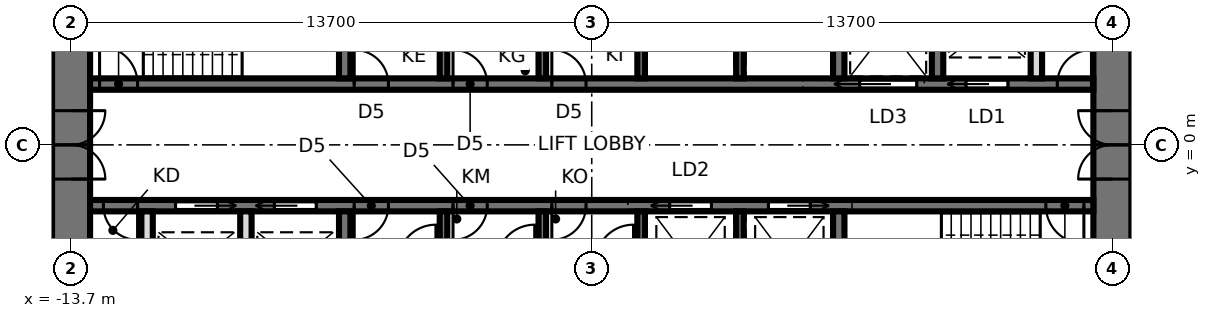
"""IFC4 building model, lengths in metres.
Left out: names, types, materials, properties, quantities, classifications, styles, units other than length and angle.
Written with IfcOpenShell. Run it as: python <this file> out.ifc"""

import sys

from ifc_helpers import new_model, si_unit, direction, frame, frame_2d, origin, place, context, subcontext, project, spatial, rectangle, extrude, element, fill, save


model = new_model("IFC4")
c1 = context("Model", 3, precision=1e-05, world=origin(), true_north=direction((0.0, 1.0)))
c2 = subcontext(c1, "Body", "Model", "MODEL_VIEW")
j1 = project(units=[si_unit("LENGTHUNIT", "METRE"), si_unit("PLANEANGLEUNIT", "RADIAN")], contexts=[c1])
p1 = place(None, origin())
s1 = spatial("IfcSite", under=j1, at=p1, CompositionType="ELEMENT")
p2 = place(p1, origin())
s2 = spatial("IfcBuilding", under=s1, at=p2, CompositionType="ELEMENT")
p3 = place(p2, frame((0.0, 0.0, 242.3)))
s3 = spatial("IfcBuildingStorey", under=s2, at=p3, CompositionType="ELEMENT", Elevation=242.3)
p4 = place(p3, frame((13.7, -9.5, 0.0), z_axis=(0.0, 0.0, 1.0), x_axis=(0.0, 1.0, 0.0)))
e1 = element("IfcWall", 1, at=p4, inside=s3, PredefinedType="SHEAR", context=c2, shape_type="SweptSolid", body=[
    extrude(rectangle(XDim=19.0, YDim=1.0, at=frame_2d((9.5, 0.0))), origin(), (0.0, 0.0, 1.0), 3.9),
])
p5 = place(p4, frame((8.6, 0.0, 0.0)))
e2 = element("IfcOpeningElement", 2, at=p5, cuts=e1, PredefinedType="OPENING", context=c2, shape_type="SweptSolid", body=[
    extrude(rectangle(XDim=1.8, YDim=2.4, at=frame_2d((0.9, 1.2))), frame((0.0, 0.51, 0.0), z_axis=(0.0, -1.0, 0.0), x_axis=(1.0, 0.0, 0.0)), (0.0, 0.0, 1.0), 1.02),
])
p6 = place(p3, frame((-13.7, 9.5, 0.0), z_axis=(0.0, 0.0, 1.0), x_axis=(0.0, -1.0, 0.0)))
e3 = element("IfcWall", 3, at=p6, inside=s3, PredefinedType="SHEAR", context=c2, shape_type="SweptSolid", body=[
    extrude(rectangle(XDim=19.0, YDim=1.0, at=frame_2d((9.5, 0.0))), origin(), (0.0, 0.0, 1.0), 3.9),
])
p7 = place(p6, frame((8.6, 0.0, 0.0)))
e4 = element("IfcOpeningElement", 4, at=p7, cuts=e3, PredefinedType="OPENING", context=c2, shape_type="SweptSolid", body=[
    extrude(rectangle(XDim=1.8, YDim=2.4, at=frame_2d((0.9, 1.2))), frame((0.0, 0.51, 0.0), z_axis=(0.0, -1.0, 0.0), x_axis=(1.0, 0.0, 0.0)), (0.0, 0.0, 1.0), 1.02),
])
p8 = place(p3, frame((-13.2, 1.6, 0.0), z_axis=(0.0, 0.0, 1.0), x_axis=(1.0, 0.0, 0.0)))
e5 = element("IfcWall", 5, at=p8, inside=s3, PredefinedType="SHEAR", context=c2, shape_type="SweptSolid", body=[
    extrude(rectangle(XDim=26.4, YDim=0.3, at=frame_2d((13.2, 0.0))), origin(), (0.0, 0.0, 1.0), 3.9),
])
p9 = place(p8, frame((0.25, 0.0, 0.0)))
e6 = element("IfcOpeningElement", 6, at=p9, cuts=e5, PredefinedType="OPENING", context=c2, shape_type="SweptSolid", body=[
    extrude(rectangle(XDim=1.0, YDim=2.1, at=frame_2d((0.5, 1.05))), frame((0.0, 0.16, 0.0), z_axis=(0.0, -1.0, 0.0), x_axis=(1.0, 0.0, 0.0)), (0.0, 0.0, 1.0), 0.32),
])
p10 = place(p8, frame((23.05, 0.0, 0.0)))
e7 = element("IfcOpeningElement", 7, at=p10, cuts=e5, PredefinedType="OPENING", context=c2, shape_type="SweptSolid", body=[
    extrude(rectangle(XDim=1.1, YDim=2.3, at=frame_2d((0.55, 1.15))), frame((0.0, 0.16, 0.0), z_axis=(0.0, -1.0, 0.0), x_axis=(1.0, 0.0, 0.0)), (0.0, 0.0, 1.0), 0.32),
])
p11 = place(p8, frame((20.25, 0.0, 0.0)))
e8 = element("IfcOpeningElement", 8, at=p11, cuts=e5, PredefinedType="OPENING", context=c2, shape_type="SweptSolid", body=[
    extrude(rectangle(XDim=1.5, YDim=2.4, at=frame_2d((0.75, 1.2))), frame((0.0, 0.16, 0.0), z_axis=(0.0, -1.0, 0.0), x_axis=(1.0, 0.0, 0.0)), (0.0, 0.0, 1.0), 0.32),
])
p12 = place(p8, frame((6.95, 0.0, 0.0)))
e9 = element("IfcOpeningElement", 9, at=p12, cuts=e5, PredefinedType="OPENING", context=c2, shape_type="SweptSolid", body=[
    extrude(rectangle(XDim=0.9, YDim=2.1, at=frame_2d((0.45, 1.05))), frame((0.0, 0.16, 0.0), z_axis=(0.0, -1.0, 0.0), x_axis=(1.0, 0.0, 0.0)), (0.0, 0.0, 1.0), 0.32),
])
p13 = place(p8, frame((9.55, 0.0, 0.0)))
e10 = element("IfcOpeningElement", 10, at=p13, cuts=e5, PredefinedType="OPENING", context=c2, shape_type="SweptSolid", body=[
    extrude(rectangle(XDim=0.9, YDim=2.1, at=frame_2d((0.45, 1.05))), frame((0.0, 0.16, 0.0), z_axis=(0.0, -1.0, 0.0), x_axis=(1.0, 0.0, 0.0)), (0.0, 0.0, 1.0), 0.32),
])
p14 = place(p8, frame((12.15, 0.0, 0.0)))
e11 = element("IfcOpeningElement", 11, at=p14, cuts=e5, PredefinedType="OPENING", context=c2, shape_type="SweptSolid", body=[
    extrude(rectangle(XDim=0.9, YDim=2.1, at=frame_2d((0.45, 1.05))), frame((0.0, 0.16, 0.0), z_axis=(0.0, -1.0, 0.0), x_axis=(1.0, 0.0, 0.0)), (0.0, 0.0, 1.0), 0.32),
])
p15 = place(p8, frame((25.45, 0.0, 0.0)))
e12 = element("IfcOpeningElement", 12, at=p15, cuts=e5, PredefinedType="OPENING", context=c2, shape_type="SweptSolid", body=[
    extrude(rectangle(XDim=0.9, YDim=2.1, at=frame_2d((0.45, 1.05))), frame((0.0, 0.16, 0.0), z_axis=(0.0, -1.0, 0.0), x_axis=(1.0, 0.0, 0.0)), (0.0, 0.0, 1.0), 0.32),
])
p16 = place(p3, frame((-13.2, -1.6, 0.0), z_axis=(0.0, 0.0, 1.0), x_axis=(1.0, 0.0, 0.0)))
e13 = element("IfcWall", 13, at=p16, inside=s3, PredefinedType="SHEAR", context=c2, shape_type="SweptSolid", body=[
    extrude(rectangle(XDim=26.4, YDim=0.3, at=frame_2d((13.2, 0.0))), origin(), (0.0, 0.0, 1.0), 3.9),
])
p17 = place(p16, frame((25.15, 0.0, 0.0)))
e14 = element("IfcOpeningElement", 14, at=p17, cuts=e13, PredefinedType="OPENING", context=c2, shape_type="SweptSolid", body=[
    extrude(rectangle(XDim=1.0, YDim=2.1, at=frame_2d((0.5, 1.05))), frame((0.0, 0.16, 0.0), z_axis=(0.0, -1.0, 0.0), x_axis=(1.0, 0.0, 0.0)), (0.0, 0.0, 1.0), 0.32),
])
p18 = place(p16, frame((6.95, 0.0, 0.0)))
e15 = element("IfcOpeningElement", 15, at=p18, cuts=e13, PredefinedType="OPENING", context=c2, shape_type="SweptSolid", body=[
    extrude(rectangle(XDim=0.9, YDim=2.1, at=frame_2d((0.45, 1.05))), frame((0.0, 0.16, 0.0), z_axis=(0.0, -1.0, 0.0), x_axis=(1.0, 0.0, 0.0)), (0.0, 0.0, 1.0), 0.32),
])
p19 = place(p16, frame((9.55, 0.0, 0.0)))
e16 = element("IfcOpeningElement", 16, at=p19, cuts=e13, PredefinedType="OPENING", context=c2, shape_type="SweptSolid", body=[
    extrude(rectangle(XDim=0.9, YDim=2.1, at=frame_2d((0.45, 1.05))), frame((0.0, 0.16, 0.0), z_axis=(0.0, -1.0, 0.0), x_axis=(1.0, 0.0, 0.0)), (0.0, 0.0, 1.0), 0.32),
])
p20 = place(p16, frame((12.15, 0.0, 0.0)))
e17 = element("IfcOpeningElement", 17, at=p20, cuts=e13, PredefinedType="OPENING", context=c2, shape_type="SweptSolid", body=[
    extrude(rectangle(XDim=0.9, YDim=2.1, at=frame_2d((0.45, 1.05))), frame((0.0, 0.16, 0.0), z_axis=(0.0, -1.0, 0.0), x_axis=(1.0, 0.0, 0.0)), (0.0, 0.0, 1.0), 0.32),
])
p21 = place(p16, frame((15.25, 0.0, 0.0)))
e18 = element("IfcOpeningElement", 18, at=p21, cuts=e13, PredefinedType="OPENING", context=c2, shape_type="SweptSolid", body=[
    extrude(rectangle(XDim=1.1, YDim=2.3, at=frame_2d((0.55, 1.15))), frame((0.0, 0.16, 0.0), z_axis=(0.0, -1.0, 0.0), x_axis=(1.0, 0.0, 0.0)), (0.0, 0.0, 1.0), 0.32),
])
p22 = place(p16, frame((17.85, 0.0, 0.0)))
e19 = element("IfcOpeningElement", 19, at=p22, cuts=e13, PredefinedType="OPENING", context=c2, shape_type="SweptSolid", body=[
    extrude(rectangle(XDim=1.1, YDim=2.3, at=frame_2d((0.55, 1.15))), frame((0.0, 0.16, 0.0), z_axis=(0.0, -1.0, 0.0), x_axis=(1.0, 0.0, 0.0)), (0.0, 0.0, 1.0), 0.32),
])
p23 = place(p16, frame((4.85, 0.0, 0.0)))
e20 = element("IfcOpeningElement", 20, at=p23, cuts=e13, PredefinedType="OPENING", context=c2, shape_type="SweptSolid", body=[
    extrude(rectangle(XDim=1.1, YDim=2.3, at=frame_2d((0.55, 1.15))), frame((0.0, 0.16, 0.0), z_axis=(0.0, -1.0, 0.0), x_axis=(1.0, 0.0, 0.0)), (0.0, 0.0, 1.0), 0.32),
])
p24 = place(p16, frame((2.25, 0.0, 0.0)))
e21 = element("IfcOpeningElement", 21, at=p24, cuts=e13, PredefinedType="OPENING", context=c2, shape_type="SweptSolid", body=[
    extrude(rectangle(XDim=1.1, YDim=2.3, at=frame_2d((0.55, 1.15))), frame((0.0, 0.16, 0.0), z_axis=(0.0, -1.0, 0.0), x_axis=(1.0, 0.0, 0.0)), (0.0, 0.0, 1.0), 0.32),
])
p25 = place(p16, frame((0.35, 0.0, 0.0)))
e22 = element("IfcOpeningElement", 22, at=p25, cuts=e13, PredefinedType="OPENING", context=c2, shape_type="SweptSolid", body=[
    extrude(rectangle(XDim=0.9, YDim=2.1, at=frame_2d((0.45, 1.05))), frame((0.0, 0.16, 0.0), z_axis=(0.0, -1.0, 0.0), x_axis=(1.0, 0.0, 0.0)), (0.0, 0.0, 1.0), 0.32),
])
for number, where, z_axis, x_axis in (
    (23, (-6.5, 1.75, 0.0), (0.0, 0.0, 1.0), (0.0, 1.0, 0.0)),
    (24, (6.5, 1.75, 0.0), (0.0, 0.0, 1.0), (0.0, 1.0, 0.0)),
):
    element("IfcWall", number, at=place(p3, frame(where, z_axis=z_axis, x_axis=x_axis)), inside=s3, PredefinedType="SHEAR", context=c2, shape_type="SweptSolid", body=[
        extrude(rectangle(XDim=2.7, YDim=0.3, at=frame_2d((1.35, 0.0))), origin(), (0.0, 0.0, 1.0), 3.9),
    ])
for number, where, z_axis, x_axis in (
    (25, (-3.9, 1.75, 0.0), (0.0, 0.0, 1.0), (0.0, 1.0, 0.0)),
    (26, (-1.3, 1.75, 0.0), (0.0, 0.0, 1.0), (0.0, 1.0, 0.0)),
    (27, (1.3, 1.75, 0.0), (0.0, 0.0, 1.0), (0.0, 1.0, 0.0)),
    (28, (3.9, 1.75, 0.0), (0.0, 0.0, 1.0), (0.0, 1.0, 0.0)),
):
    element("IfcWall", number, at=place(p3, frame(where, z_axis=z_axis, x_axis=x_axis)), inside=s3, PredefinedType="SHEAR", context=c2, shape_type="SweptSolid", body=[
        extrude(rectangle(XDim=2.7, YDim=0.2, at=frame_2d((1.35, 0.0))), origin(), (0.0, 0.0, 1.0), 3.9),
    ])
for number, where, z_axis, x_axis in (
    (29, (-6.5, -1.75, 0.0), (0.0, 0.0, 1.0), (0.0, -1.0, 0.0)),
    (30, (6.5, -1.75, 0.0), (0.0, 0.0, 1.0), (0.0, -1.0, 0.0)),
):
    element("IfcWall", number, at=place(p3, frame(where, z_axis=z_axis, x_axis=x_axis)), inside=s3, PredefinedType="SHEAR", context=c2, shape_type="SweptSolid", body=[
        extrude(rectangle(XDim=2.7, YDim=0.3, at=frame_2d((1.35, 0.0))), origin(), (0.0, 0.0, 1.0), 3.9),
    ])
for number, where, z_axis, x_axis in (
    (31, (-3.9, -1.75, 0.0), (0.0, 0.0, 1.0), (0.0, -1.0, 0.0)),
    (32, (-1.3, -1.75, 0.0), (0.0, 0.0, 1.0), (0.0, -1.0, 0.0)),
    (33, (1.3, -1.75, 0.0), (0.0, 0.0, 1.0), (0.0, -1.0, 0.0)),
    (34, (3.9, -1.75, 0.0), (0.0, 0.0, 1.0), (0.0, -1.0, 0.0)),
):
    element("IfcWall", number, at=place(p3, frame(where, z_axis=z_axis, x_axis=x_axis)), inside=s3, PredefinedType="SHEAR", context=c2, shape_type="SweptSolid", body=[
        extrude(rectangle(XDim=2.7, YDim=0.2, at=frame_2d((1.35, 0.0))), origin(), (0.0, 0.0, 1.0), 3.9),
    ])
p26 = place(p3, frame((9.1, 1.75, 0.0), z_axis=(0.0, 0.0, 1.0), x_axis=(0.0, 1.0, 0.0)))
e35 = element("IfcWall", 35, at=p26, inside=s3, PredefinedType="SHEAR", context=c2, shape_type="SweptSolid", body=[
    extrude(rectangle(XDim=2.7, YDim=0.3, at=frame_2d((1.35, 0.0))), origin(), (0.0, 0.0, 1.0), 3.9),
])
for number, where, z_axis, x_axis in (
    (36, (-9.1, -1.75, 0.0), (0.0, 0.0, 1.0), (0.0, -1.0, 0.0)),
    (37, (-11.7, -1.75, 0.0), (0.0, 0.0, 1.0), (0.0, -1.0, 0.0)),
    (38, (11.7, 1.75, 0.0), (0.0, 0.0, 1.0), (0.0, 1.0, 0.0)),
):
    element("IfcWall", number, at=place(p3, frame(where, z_axis=z_axis, x_axis=x_axis)), inside=s3, PredefinedType="SOLIDWALL", context=c2, shape_type="SweptSolid", body=[
        extrude(rectangle(XDim=2.7, YDim=0.3, at=frame_2d((1.35, 0.0))), origin(), (0.0, 0.0, 1.0), 3.7),
    ])
p27 = place(p7, origin())
e39 = element("IfcDoor", 39, at=p27, inside=s3, OperationType="DOUBLE_DOOR_SINGLE_SWING", PredefinedType="DOOR", context=c2, shape_type="SweptSolid", body=[
    extrude(rectangle(XDim=1.72, YDim=2.36, at=frame_2d((0.9, 1.18))), frame((0.0, 0.025, 0.0), z_axis=(0.0, -1.0, 0.0), x_axis=(1.0, 0.0, 0.0)), (0.0, 0.0, 1.0), 0.05),
    extrude(rectangle(XDim=0.04, YDim=2.4, at=frame_2d((0.02, 1.2))), frame((0.0, 0.25, 0.0), z_axis=(0.0, -1.0, 0.0), x_axis=(1.0, 0.0, 0.0)), (0.0, 0.0, 1.0), 0.5),
    extrude(rectangle(XDim=0.04, YDim=2.4, at=frame_2d((1.78, 1.2))), frame((0.0, 0.25, 0.0), z_axis=(0.0, -1.0, 0.0), x_axis=(1.0, 0.0, 0.0)), (0.0, 0.0, 1.0), 0.5),
    extrude(rectangle(XDim=1.72, YDim=0.04, at=frame_2d((0.9, 2.38))), frame((0.0, 0.25, 0.0), z_axis=(0.0, -1.0, 0.0), x_axis=(1.0, 0.0, 0.0)), (0.0, 0.0, 1.0), 0.5),
])
fill(e4, e39)
p28 = place(p5, origin())
e40 = element("IfcDoor", 40, at=p28, inside=s3, OperationType="DOUBLE_DOOR_SINGLE_SWING", PredefinedType="DOOR", context=c2, shape_type="SweptSolid", body=[
    extrude(rectangle(XDim=1.72, YDim=2.36, at=frame_2d((0.9, 1.18))), frame((0.0, 0.025, 0.0), z_axis=(0.0, -1.0, 0.0), x_axis=(1.0, 0.0, 0.0)), (0.0, 0.0, 1.0), 0.05),
    extrude(rectangle(XDim=0.04, YDim=2.4, at=frame_2d((0.02, 1.2))), frame((0.0, 0.25, 0.0), z_axis=(0.0, -1.0, 0.0), x_axis=(1.0, 0.0, 0.0)), (0.0, 0.0, 1.0), 0.5),
    extrude(rectangle(XDim=0.04, YDim=2.4, at=frame_2d((1.78, 1.2))), frame((0.0, 0.25, 0.0), z_axis=(0.0, -1.0, 0.0), x_axis=(1.0, 0.0, 0.0)), (0.0, 0.0, 1.0), 0.5),
    extrude(rectangle(XDim=1.72, YDim=0.04, at=frame_2d((0.9, 2.38))), frame((0.0, 0.25, 0.0), z_axis=(0.0, -1.0, 0.0), x_axis=(1.0, 0.0, 0.0)), (0.0, 0.0, 1.0), 0.5),
])
fill(e2, e40)
p29 = place(p9, origin())
e41 = element("IfcDoor", 41, at=p29, inside=s3, OperationType="SINGLE_SWING_LEFT", PredefinedType="DOOR", context=c2, shape_type="SweptSolid", body=[
    extrude(rectangle(XDim=1.0, YDim=2.1, at=frame_2d((0.5, 1.05))), frame((0.0, 0.025, 0.0), z_axis=(0.0, -1.0, 0.0), x_axis=(1.0, 0.0, 0.0)), (0.0, 0.0, 1.0), 0.05),
])
fill(e6, e41)
p30 = place(p17, frame((1.0, 0.0, 0.0), z_axis=(0.0, 0.0, 1.0), x_axis=(-1.0, 0.0, 0.0)))
e42 = element("IfcDoor", 42, at=p30, inside=s3, OperationType="SINGLE_SWING_LEFT", PredefinedType="DOOR", context=c2, shape_type="SweptSolid", body=[
    extrude(rectangle(XDim=1.0, YDim=2.1, at=frame_2d((0.5, 1.05))), frame((0.0, 0.025, 0.0), z_axis=(0.0, -1.0, 0.0), x_axis=(1.0, 0.0, 0.0)), (0.0, 0.0, 1.0), 0.05),
])
fill(e14, e42)
p31 = place(p10, origin())
e43 = element("IfcDoor", 43, at=p31, inside=s3, OperationType="SLIDING_TO_LEFT", PredefinedType="DOOR", context=c2, shape_type="SweptSolid", body=[
    extrude(rectangle(XDim=1.1, YDim=2.3, at=frame_2d((0.55, 1.15))), frame((0.0, 0.025, 0.0), z_axis=(0.0, -1.0, 0.0), x_axis=(1.0, 0.0, 0.0)), (0.0, 0.0, 1.0), 0.05),
])
fill(e7, e43)
p32 = place(p11, origin())
e44 = element("IfcDoor", 44, at=p32, inside=s3, OperationType="SLIDING_TO_LEFT", PredefinedType="DOOR", context=c2, shape_type="SweptSolid", body=[
    extrude(rectangle(XDim=1.5, YDim=2.4, at=frame_2d((0.75, 1.2))), frame((0.0, 0.025, 0.0), z_axis=(0.0, -1.0, 0.0), x_axis=(1.0, 0.0, 0.0)), (0.0, 0.0, 1.0), 0.05),
])
fill(e8, e44)
p33 = place(p12, origin())
e45 = element("IfcDoor", 45, at=p33, inside=s3, OperationType="SINGLE_SWING_LEFT", PredefinedType="DOOR", context=c2, shape_type="SweptSolid", body=[
    extrude(rectangle(XDim=0.9, YDim=2.1, at=frame_2d((0.45, 1.05))), frame((0.0, 0.025, 0.0), z_axis=(0.0, -1.0, 0.0), x_axis=(1.0, 0.0, 0.0)), (0.0, 0.0, 1.0), 0.05),
])
fill(e9, e45)
p34 = place(p13, origin())
e46 = element("IfcDoor", 46, at=p34, inside=s3, OperationType="SINGLE_SWING_LEFT", PredefinedType="DOOR", context=c2, shape_type="SweptSolid", body=[
    extrude(rectangle(XDim=0.9, YDim=2.1, at=frame_2d((0.45, 1.05))), frame((0.0, 0.025, 0.0), z_axis=(0.0, -1.0, 0.0), x_axis=(1.0, 0.0, 0.0)), (0.0, 0.0, 1.0), 0.05),
])
fill(e10, e46)
p35 = place(p14, origin())
e47 = element("IfcDoor", 47, at=p35, inside=s3, OperationType="SINGLE_SWING_LEFT", PredefinedType="DOOR", context=c2, shape_type="SweptSolid", body=[
    extrude(rectangle(XDim=0.9, YDim=2.1, at=frame_2d((0.45, 1.05))), frame((0.0, 0.025, 0.0), z_axis=(0.0, -1.0, 0.0), x_axis=(1.0, 0.0, 0.0)), (0.0, 0.0, 1.0), 0.05),
])
fill(e11, e47)
p36 = place(p18, frame((0.9, 0.0, 0.0), z_axis=(0.0, 0.0, 1.0), x_axis=(-1.0, 0.0, 0.0)))
e48 = element("IfcDoor", 48, at=p36, inside=s3, OperationType="SINGLE_SWING_RIGHT", PredefinedType="DOOR", context=c2, shape_type="SweptSolid", body=[
    extrude(rectangle(XDim=0.9, YDim=2.1, at=frame_2d((0.45, 1.05))), frame((0.0, 0.025, 0.0), z_axis=(0.0, -1.0, 0.0), x_axis=(1.0, 0.0, 0.0)), (0.0, 0.0, 1.0), 0.05),
])
fill(e15, e48)
p37 = place(p19, frame((0.9, 0.0, 0.0), z_axis=(0.0, 0.0, 1.0), x_axis=(-1.0, 0.0, 0.0)))
e49 = element("IfcDoor", 49, at=p37, inside=s3, OperationType="SINGLE_SWING_RIGHT", PredefinedType="DOOR", context=c2, shape_type="SweptSolid", body=[
    extrude(rectangle(XDim=0.9, YDim=2.1, at=frame_2d((0.45, 1.05))), frame((0.0, 0.025, 0.0), z_axis=(0.0, -1.0, 0.0), x_axis=(1.0, 0.0, 0.0)), (0.0, 0.0, 1.0), 0.05),
])
fill(e16, e49)
p38 = place(p20, frame((0.9, 0.0, 0.0), z_axis=(0.0, 0.0, 1.0), x_axis=(-1.0, 0.0, 0.0)))
e50 = element("IfcDoor", 50, at=p38, inside=s3, OperationType="SINGLE_SWING_RIGHT", PredefinedType="DOOR", context=c2, shape_type="SweptSolid", body=[
    extrude(rectangle(XDim=0.9, YDim=2.1, at=frame_2d((0.45, 1.05))), frame((0.0, 0.025, 0.0), z_axis=(0.0, -1.0, 0.0), x_axis=(1.0, 0.0, 0.0)), (0.0, 0.0, 1.0), 0.05),
])
fill(e17, e50)
p39 = place(p21, frame((1.1, 0.0, 0.0), z_axis=(0.0, 0.0, 1.0), x_axis=(-1.0, 0.0, 0.0)))
e51 = element("IfcDoor", 51, at=p39, inside=s3, OperationType="SLIDING_TO_RIGHT", PredefinedType="DOOR", context=c2, shape_type="SweptSolid", body=[
    extrude(rectangle(XDim=1.1, YDim=2.3, at=frame_2d((0.55, 1.15))), frame((0.0, 0.025, 0.0), z_axis=(0.0, -1.0, 0.0), x_axis=(1.0, 0.0, 0.0)), (0.0, 0.0, 1.0), 0.05),
])
fill(e18, e51)
p40 = place(p22, frame((1.1, 0.0, 0.0), z_axis=(0.0, 0.0, 1.0), x_axis=(-1.0, 0.0, 0.0)))
e52 = element("IfcDoor", 52, at=p40, inside=s3, OperationType="SLIDING_TO_LEFT", PredefinedType="DOOR", context=c2, shape_type="SweptSolid", body=[
    extrude(rectangle(XDim=1.1, YDim=2.3, at=frame_2d((0.55, 1.15))), frame((0.0, 0.025, 0.0), z_axis=(0.0, -1.0, 0.0), x_axis=(1.0, 0.0, 0.0)), (0.0, 0.0, 1.0), 0.05),
])
fill(e19, e52)
p41 = place(p23, frame((1.1, 0.0, 0.0), z_axis=(0.0, 0.0, 1.0), x_axis=(-1.0, 0.0, 0.0)))
e53 = element("IfcDoor", 53, at=p41, inside=s3, OperationType="SLIDING_TO_RIGHT", PredefinedType="DOOR", context=c2, shape_type="SweptSolid", body=[
    extrude(rectangle(XDim=1.1, YDim=2.3, at=frame_2d((0.55, 1.15))), frame((0.0, 0.025, 0.0), z_axis=(0.0, -1.0, 0.0), x_axis=(1.0, 0.0, 0.0)), (0.0, 0.0, 1.0), 0.05),
])
fill(e20, e53)
p42 = place(p24, frame((1.1, 0.0, 0.0), z_axis=(0.0, 0.0, 1.0), x_axis=(-1.0, 0.0, 0.0)))
e54 = element("IfcDoor", 54, at=p42, inside=s3, OperationType="SLIDING_TO_LEFT", PredefinedType="DOOR", context=c2, shape_type="SweptSolid", body=[
    extrude(rectangle(XDim=1.1, YDim=2.3, at=frame_2d((0.55, 1.15))), frame((0.0, 0.025, 0.0), z_axis=(0.0, -1.0, 0.0), x_axis=(1.0, 0.0, 0.0)), (0.0, 0.0, 1.0), 0.05),
])
fill(e21, e54)
p43 = place(p15, origin())
e55 = element("IfcDoor", 55, at=p43, inside=s3, OperationType="SINGLE_SWING_RIGHT", PredefinedType="DOOR", context=c2, shape_type="SweptSolid", body=[
    extrude(rectangle(XDim=0.9, YDim=2.1, at=frame_2d((0.45, 1.05))), frame((0.0, 0.025, 0.0), z_axis=(0.0, -1.0, 0.0), x_axis=(1.0, 0.0, 0.0)), (0.0, 0.0, 1.0), 0.05),
])
fill(e12, e55)
p44 = place(p25, frame((0.9, 0.0, 0.0), z_axis=(0.0, 0.0, 1.0), x_axis=(-1.0, 0.0, 0.0)))
e56 = element("IfcDoor", 56, at=p44, inside=s3, OperationType="SINGLE_SWING_LEFT", PredefinedType="DOOR", context=c2, shape_type="SweptSolid", body=[
    extrude(rectangle(XDim=0.9, YDim=2.1, at=frame_2d((0.45, 1.05))), frame((0.0, 0.025, 0.0), z_axis=(0.0, -1.0, 0.0), x_axis=(1.0, 0.0, 0.0)), (0.0, 0.0, 1.0), 0.05),
])
fill(e22, e56)
save(model, sys.argv[1])
